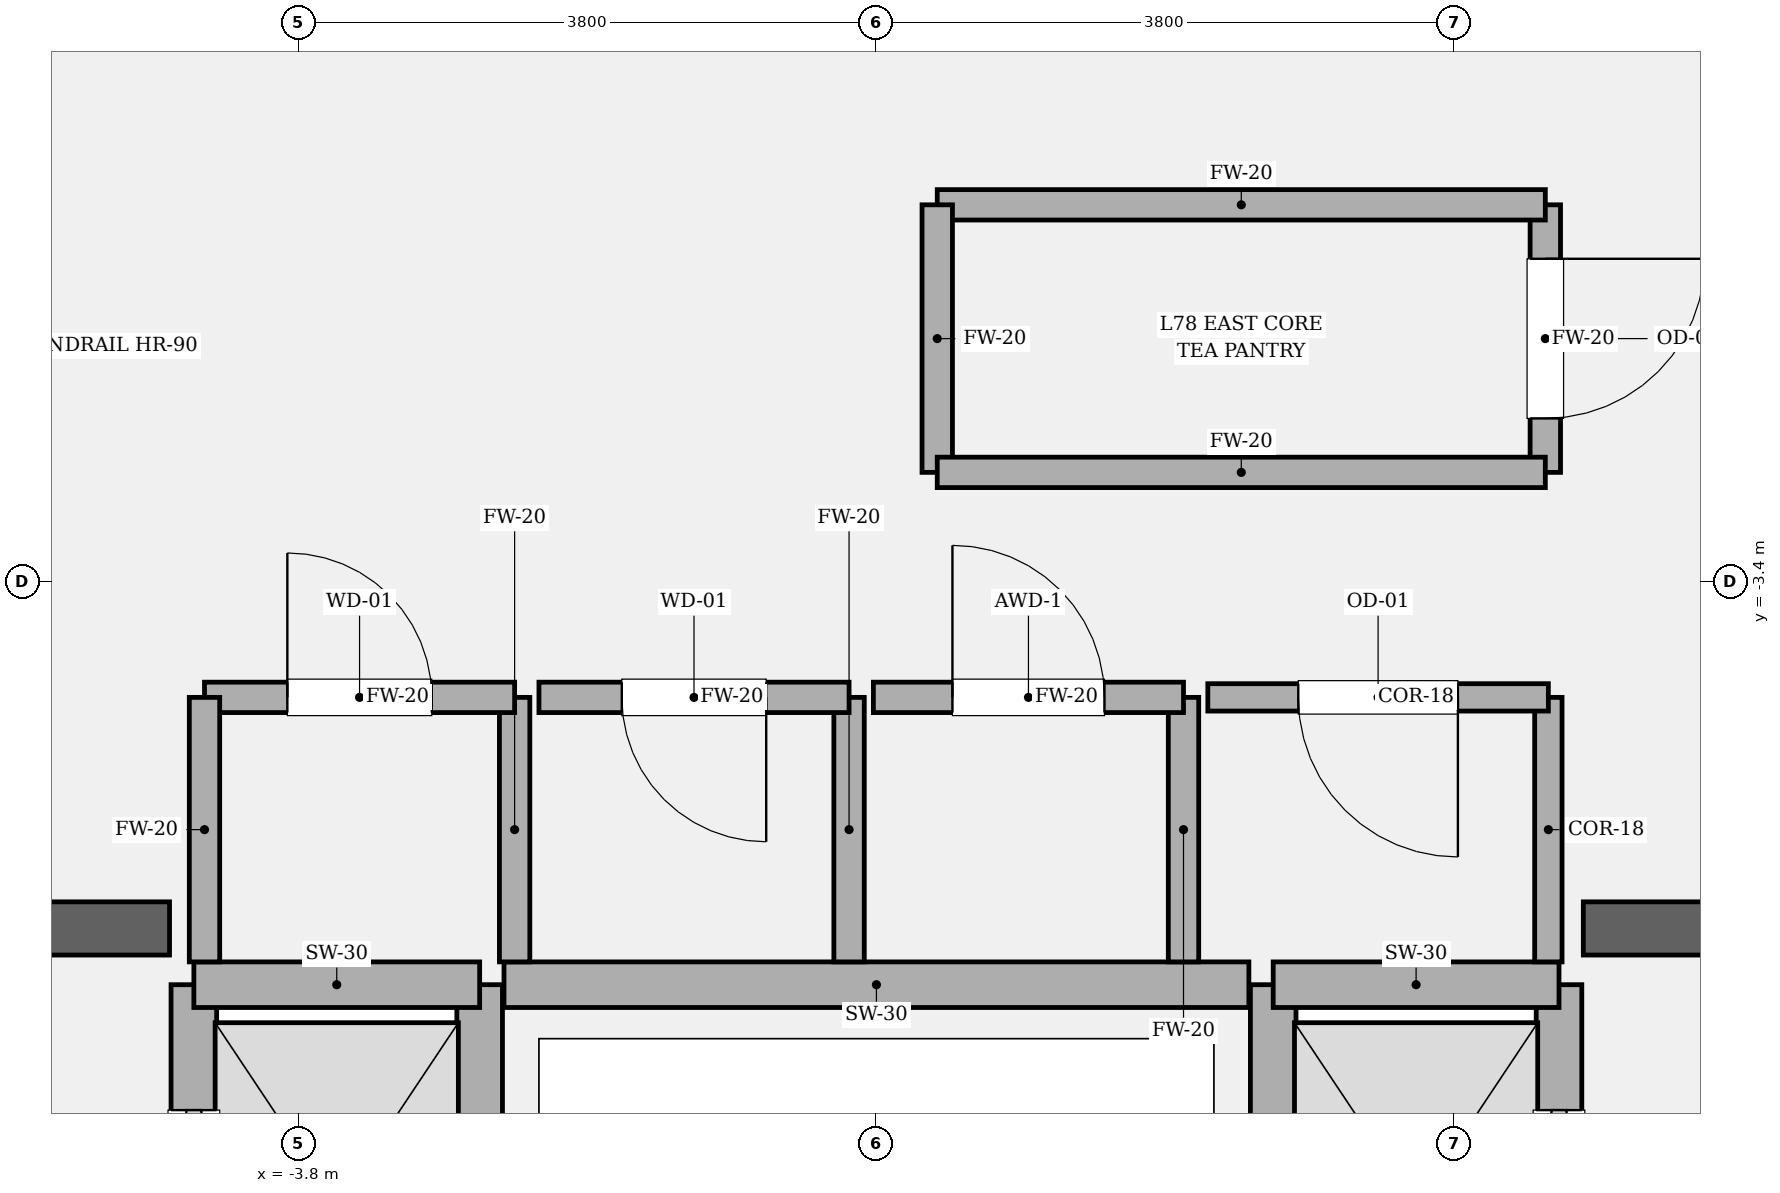
"""IFC4 building model, lengths in metres.
Left out: names, types, materials, properties, quantities, classifications, styles, units other than length and angle.
Written with IfcOpenShell. Run it as: python <this file> out.ifc"""

import sys

from ifc_helpers import new_model, si_unit, direction, frame, frame_2d, origin, place, context, subcontext, project, spatial, rectangle, extrude, element, fill, save


model = new_model("IFC4")
c1 = context("Model", 3, precision=1e-05, world=origin(), true_north=direction((0.0, 1.0)))
c2 = subcontext(c1, "Body", "Model", "MODEL_VIEW")
j1 = project(units=[si_unit("LENGTHUNIT", "METRE"), si_unit("PLANEANGLEUNIT", "RADIAN")], contexts=[c1])
p1 = place(None, origin())
s1 = spatial("IfcSite", under=j1, at=p1, CompositionType="ELEMENT")
p2 = place(p1, origin())
s2 = spatial("IfcBuilding", under=s1, at=p2, CompositionType="ELEMENT")
p3 = place(p2, frame((0.0, 0.0, 330.0)))
s3 = spatial("IfcBuildingStorey", under=s2, at=p3, CompositionType="ELEMENT", Elevation=330.0)
p4 = place(p3, frame((-9.975, -5.68, 0.0), z_axis=(0.0, 0.0, 1.0), x_axis=(1.0, 0.0, 0.0)))
e1 = element("IfcWall", 1, at=p4, inside=s3, PredefinedType="SOLIDWALL", context=c2, shape_type="SweptSolid", body=[
    extrude(rectangle(XDim=5.325, YDim=0.35, at=frame_2d((2.663, 0.0))), origin(), (0.0, 0.0, 1.0), 4.2),
])
p5 = place(p4, frame((1.435, 0.0, 0.0)))
e2 = element("IfcOpeningElement", 2, at=p5, cuts=e1, PredefinedType="OPENING", context=c2, shape_type="SweptSolid", body=[
    extrude(rectangle(XDim=1.18, YDim=2.2, at=frame_2d((0.59, 1.1))), frame((0.0, 0.185, 0.0), z_axis=(0.0, -1.0, 0.0), x_axis=(1.0, 0.0, 0.0)), (0.0, 0.0, 1.0), 0.37),
])
p6 = place(p3, frame((4.65, -5.68, 0.0), z_axis=(0.0, 0.0, 1.0), x_axis=(1.0, 0.0, 0.0)))
e3 = element("IfcWall", 3, at=p6, inside=s3, PredefinedType="SOLIDWALL", context=c2, shape_type="SweptSolid", body=[
    extrude(rectangle(XDim=5.325, YDim=0.35, at=frame_2d((2.663, 0.0))), origin(), (0.0, 0.0, 1.0), 4.2),
])
p7 = place(p6, frame((2.71, 0.0, 0.0)))
e4 = element("IfcOpeningElement", 4, at=p7, cuts=e3, PredefinedType="OPENING", context=c2, shape_type="SweptSolid", body=[
    extrude(rectangle(XDim=1.18, YDim=2.2, at=frame_2d((0.59, 1.1))), frame((0.0, 0.185, 0.0), z_axis=(0.0, -1.0, 0.0), x_axis=(1.0, 0.0, 0.0)), (0.0, 0.0, 1.0), 0.37),
])
p8 = place(p3, frame((-4.49, -8.82, 0.0), z_axis=(0.0, 0.0, 1.0), x_axis=(0.0, 1.0, 0.0)))
e5 = element("IfcWall", 5, at=p8, inside=s3, PredefinedType="SOLIDWALL", context=c2, shape_type="SweptSolid", body=[
    extrude(rectangle(XDim=2.77, YDim=0.3, at=frame_2d((1.385, 0.0))), origin(), (0.0, 0.0, 1.0), 3.94),
])
p9 = place(p8, frame((0.825, 0.0, 0.0)))
e6 = element("IfcOpeningElement", 6, at=p9, cuts=e5, PredefinedType="OPENING", context=c2, shape_type="SweptSolid", body=[
    extrude(rectangle(XDim=1.12, YDim=2.25, at=frame_2d((0.56, 1.125))), frame((0.0, 0.16, 0.0), z_axis=(0.0, -1.0, 0.0), x_axis=(1.0, 0.0, 0.0)), (0.0, 0.0, 1.0), 0.32),
])
p10 = place(p3, frame((-2.61, -8.82, 0.0), z_axis=(0.0, 0.0, 1.0), x_axis=(0.0, 1.0, 0.0)))
e7 = element("IfcWall", 7, at=p10, inside=s3, PredefinedType="SOLIDWALL", context=c2, shape_type="SweptSolid", body=[
    extrude(rectangle(XDim=2.77, YDim=0.3, at=frame_2d((1.385, 0.0))), origin(), (0.0, 0.0, 1.0), 3.94),
])
p11 = place(p3, frame((-4.49, -6.05, 0.0), z_axis=(0.0, 0.0, 1.0), x_axis=(1.0, 0.0, 0.0)))
e8 = element("IfcWall", 8, at=p11, inside=s3, PredefinedType="SOLIDWALL", context=c2, shape_type="SweptSolid", body=[
    extrude(rectangle(XDim=1.88, YDim=0.3, at=frame_2d((0.94, 0.0))), origin(), (0.0, 0.0, 1.0), 3.94),
])
p12 = place(p3, frame((4.49, -8.82, 0.0), z_axis=(0.0, 0.0, 1.0), x_axis=(0.0, 1.0, 0.0)))
e9 = element("IfcWall", 9, at=p12, inside=s3, PredefinedType="SOLIDWALL", context=c2, shape_type="SweptSolid", body=[
    extrude(rectangle(XDim=2.77, YDim=0.3, at=frame_2d((1.385, 0.0))), origin(), (0.0, 0.0, 1.0), 3.94),
])
p13 = place(p12, frame((0.825, 0.0, 0.0)))
e10 = element("IfcOpeningElement", 10, at=p13, cuts=e9, PredefinedType="OPENING", context=c2, shape_type="SweptSolid", body=[
    extrude(rectangle(XDim=1.12, YDim=2.25, at=frame_2d((0.56, 1.125))), frame((0.0, 0.16, 0.0), z_axis=(0.0, -1.0, 0.0), x_axis=(1.0, 0.0, 0.0)), (0.0, 0.0, 1.0), 0.32),
])
p14 = place(p3, frame((2.61, -8.82, 0.0), z_axis=(0.0, 0.0, 1.0), x_axis=(0.0, 1.0, 0.0)))
e11 = element("IfcWall", 11, at=p14, inside=s3, PredefinedType="SOLIDWALL", context=c2, shape_type="SweptSolid", body=[
    extrude(rectangle(XDim=2.77, YDim=0.3, at=frame_2d((1.385, 0.0))), origin(), (0.0, 0.0, 1.0), 3.94),
])
p15 = place(p3, frame((2.61, -6.05, 0.0), z_axis=(0.0, 0.0, 1.0), x_axis=(1.0, 0.0, 0.0)))
e12 = element("IfcWall", 12, at=p15, inside=s3, PredefinedType="SOLIDWALL", context=c2, shape_type="SweptSolid", body=[
    extrude(rectangle(XDim=1.88, YDim=0.3, at=frame_2d((0.94, 0.0))), origin(), (0.0, 0.0, 1.0), 3.94),
])
p16 = place(p3, frame((-2.45, -6.05, 0.0), z_axis=(0.0, 0.0, 1.0), x_axis=(1.0, 0.0, 0.0)))
e13 = element("IfcWall", 13, at=p16, inside=s3, PredefinedType="SOLIDWALL", context=c2, shape_type="SweptSolid", body=[
    extrude(rectangle(XDim=4.9, YDim=0.3, at=frame_2d((2.45, 0.0))), origin(), (0.0, 0.0, 1.0), 3.94),
])
p17 = place(p3, frame((-2.38, -5.9, 0.0), z_axis=(0.0, 0.0, 1.0), x_axis=(0.0, 1.0, 0.0)))
e14 = element("IfcWall", 14, at=p17, inside=s3, PredefinedType="SOLIDWALL", context=c2, shape_type="SweptSolid", body=[
    extrude(rectangle(XDim=1.74, YDim=0.2, at=frame_2d((0.87, 0.0))), origin(), (0.0, 0.0, 1.0), 3.94),
])
p18 = place(p3, frame((-2.38, -4.16, 0.0), z_axis=(0.0, 0.0, 1.0), x_axis=(-1.0, 0.0, 0.0)))
e15 = element("IfcWall", 15, at=p18, inside=s3, PredefinedType="SOLIDWALL", context=c2, shape_type="SweptSolid", body=[
    extrude(rectangle(XDim=2.04, YDim=0.2, at=frame_2d((1.02, 0.0))), origin(), (0.0, 0.0, 1.0), 3.94),
])
p19 = place(p18, frame((0.545, 0.0, 0.0)))
e16 = element("IfcOpeningElement", 16, at=p19, cuts=e15, PredefinedType="OPENING", context=c2, shape_type="SweptSolid", body=[
    extrude(rectangle(XDim=0.95, YDim=2.15, at=frame_2d((0.475, 1.075))), frame((0.0, 0.11, 0.0), z_axis=(0.0, -1.0, 0.0), x_axis=(1.0, 0.0, 0.0)), (0.0, 0.0, 1.0), 0.22),
])
for number, where, z_axis, x_axis in (
    (17, (-4.42, -4.16, 0.0), (0.0, 0.0, 1.0), (0.0, -1.0, 0.0)),
    (18, (-0.18, -5.9, 0.0), (0.0, 0.0, 1.0), (0.0, 1.0, 0.0)),
):
    element("IfcWall", number, at=place(p3, frame(where, z_axis=z_axis, x_axis=x_axis)), inside=s3, PredefinedType="SOLIDWALL", context=c2, shape_type="SweptSolid", body=[
        extrude(rectangle(XDim=1.74, YDim=0.2, at=frame_2d((0.87, 0.0))), origin(), (0.0, 0.0, 1.0), 3.94),
    ])
p20 = place(p3, frame((-0.18, -4.16, 0.0), z_axis=(0.0, 0.0, 1.0), x_axis=(-1.0, 0.0, 0.0)))
e19 = element("IfcWall", 19, at=p20, inside=s3, PredefinedType="SOLIDWALL", context=c2, shape_type="SweptSolid", body=[
    extrude(rectangle(XDim=2.04, YDim=0.2, at=frame_2d((1.02, 0.0))), origin(), (0.0, 0.0, 1.0), 3.94),
])
p21 = place(p20, frame((0.545, 0.0, 0.0)))
e20 = element("IfcOpeningElement", 20, at=p21, cuts=e19, PredefinedType="OPENING", context=c2, shape_type="SweptSolid", body=[
    extrude(rectangle(XDim=0.95, YDim=2.15, at=frame_2d((0.475, 1.075))), frame((0.0, 0.11, 0.0), z_axis=(0.0, -1.0, 0.0), x_axis=(1.0, 0.0, 0.0)), (0.0, 0.0, 1.0), 0.22),
])
p22 = place(p3, frame((2.02, -5.9, 0.0), z_axis=(0.0, 0.0, 1.0), x_axis=(0.0, 1.0, 0.0)))
e21 = element("IfcWall", 21, at=p22, inside=s3, PredefinedType="SOLIDWALL", context=c2, shape_type="SweptSolid", body=[
    extrude(rectangle(XDim=1.74, YDim=0.2, at=frame_2d((0.87, 0.0))), origin(), (0.0, 0.0, 1.0), 3.94),
])
p23 = place(p3, frame((2.02, -4.16, 0.0), z_axis=(0.0, 0.0, 1.0), x_axis=(-1.0, 0.0, 0.0)))
e22 = element("IfcWall", 22, at=p23, inside=s3, PredefinedType="SOLIDWALL", context=c2, shape_type="SweptSolid", body=[
    extrude(rectangle(XDim=2.04, YDim=0.2, at=frame_2d((1.02, 0.0))), origin(), (0.0, 0.0, 1.0), 3.94),
])
p24 = place(p23, frame((0.52, 0.0, 0.0)))
e23 = element("IfcOpeningElement", 23, at=p24, cuts=e22, PredefinedType="OPENING", context=c2, shape_type="SweptSolid", body=[
    extrude(rectangle(XDim=1.0, YDim=2.15, at=frame_2d((0.5, 1.075))), frame((0.0, 0.11, 0.0), z_axis=(0.0, -1.0, 0.0), x_axis=(1.0, 0.0, 0.0)), (0.0, 0.0, 1.0), 0.22),
])
p25 = place(p3, frame((4.42, -5.9, 0.0), z_axis=(0.0, 0.0, 1.0), x_axis=(0.0, 1.0, 0.0)))
e24 = element("IfcWall", 24, at=p25, inside=s3, PredefinedType="PARTITIONING", context=c2, shape_type="SweptSolid", body=[
    extrude(rectangle(XDim=1.74, YDim=0.18, at=frame_2d((0.87, 0.0))), origin(), (0.0, 0.0, 1.0), 3.94),
])
p26 = place(p3, frame((4.42, -4.16, 0.0), z_axis=(0.0, 0.0, 1.0), x_axis=(-1.0, 0.0, 0.0)))
e25 = element("IfcWall", 25, at=p26, inside=s3, PredefinedType="PARTITIONING", context=c2, shape_type="SweptSolid", body=[
    extrude(rectangle(XDim=2.24, YDim=0.18, at=frame_2d((1.12, 0.0))), origin(), (0.0, 0.0, 1.0), 3.94),
])
p27 = place(p26, frame((0.595, 0.0, 0.0)))
e26 = element("IfcOpeningElement", 26, at=p27, cuts=e25, PredefinedType="OPENING", context=c2, shape_type="SweptSolid", body=[
    extrude(rectangle(XDim=1.05, YDim=2.2, at=frame_2d((0.525, 1.1))), frame((0.0, 0.1, 0.0), z_axis=(0.0, -1.0, 0.0), x_axis=(1.0, 0.0, 0.0)), (0.0, 0.0, 1.0), 0.2),
])
p28 = place(p3, frame((4.4, -2.68, 0.0), z_axis=(0.0, 0.0, 1.0), x_axis=(0.0, 1.0, 0.0)))
e27 = element("IfcWall", 27, at=p28, inside=s3, PredefinedType="SOLIDWALL", context=c2, shape_type="SweptSolid", body=[
    extrude(rectangle(XDim=1.76, YDim=0.2, at=frame_2d((0.88, 0.0))), origin(), (0.0, 0.0, 1.0), 3.94),
])
p29 = place(p28, frame((0.355, 0.0, 0.0)))
e28 = element("IfcOpeningElement", 28, at=p29, cuts=e27, PredefinedType="OPENING", context=c2, shape_type="SweptSolid", body=[
    extrude(rectangle(XDim=1.05, YDim=2.2, at=frame_2d((0.525, 1.1))), frame((0.0, 0.11, 0.0), z_axis=(0.0, -1.0, 0.0), x_axis=(1.0, 0.0, 0.0)), (0.0, 0.0, 1.0), 0.22),
])
p30 = place(p3, frame((4.4, -0.92, 0.0), z_axis=(0.0, 0.0, 1.0), x_axis=(-1.0, 0.0, 0.0)))
e29 = element("IfcWall", 29, at=p30, inside=s3, PredefinedType="SOLIDWALL", context=c2, shape_type="SweptSolid", body=[
    extrude(rectangle(XDim=4.0, YDim=0.2, at=frame_2d((2.0, 0.0))), origin(), (0.0, 0.0, 1.0), 3.94),
])
p31 = place(p3, frame((0.4, -0.92, 0.0), z_axis=(0.0, 0.0, 1.0), x_axis=(0.0, -1.0, 0.0)))
e30 = element("IfcWall", 30, at=p31, inside=s3, PredefinedType="SOLIDWALL", context=c2, shape_type="SweptSolid", body=[
    extrude(rectangle(XDim=1.76, YDim=0.2, at=frame_2d((0.88, 0.0))), origin(), (0.0, 0.0, 1.0), 3.94),
])
p32 = place(p3, frame((0.4, -2.68, 0.0), z_axis=(0.0, 0.0, 1.0), x_axis=(1.0, 0.0, 0.0)))
e31 = element("IfcWall", 31, at=p32, inside=s3, PredefinedType="SOLIDWALL", context=c2, shape_type="SweptSolid", body=[
    extrude(rectangle(XDim=4.0, YDim=0.2, at=frame_2d((2.0, 0.0))), origin(), (0.0, 0.0, 1.0), 3.94),
])
p33 = place(p9, origin())
e32 = element("IfcDoor", 32, at=p33, inside=s3, OperationType="SLIDING_TO_LEFT", PredefinedType="DOOR", context=c2, shape_type="SweptSolid", body=[
    extrude(rectangle(XDim=1.12, YDim=2.25, at=frame_2d((0.56, 1.125))), frame((0.0, 0.025, 0.0), z_axis=(0.0, -1.0, 0.0), x_axis=(1.0, 0.0, 0.0)), (0.0, 0.0, 1.0), 0.05),
])
fill(e6, e32)
p34 = place(p13, origin())
e33 = element("IfcDoor", 33, at=p34, inside=s3, OperationType="SLIDING_TO_RIGHT", PredefinedType="DOOR", context=c2, shape_type="SweptSolid", body=[
    extrude(rectangle(XDim=1.12, YDim=2.25, at=frame_2d((0.56, 1.125))), frame((0.0, 0.025, 0.0), z_axis=(0.0, -1.0, 0.0), x_axis=(1.0, 0.0, 0.0)), (0.0, 0.0, 1.0), 0.05),
])
fill(e10, e33)
p35 = place(p19, origin())
e34 = element("IfcDoor", 34, at=p35, inside=s3, OperationType="SINGLE_SWING_RIGHT", PredefinedType="DOOR", context=c2, shape_type="SweptSolid", body=[
    extrude(rectangle(XDim=0.95, YDim=2.15, at=frame_2d((0.475, 1.075))), frame((0.0, 0.025, 0.0), z_axis=(0.0, -1.0, 0.0), x_axis=(1.0, 0.0, 0.0)), (0.0, 0.0, 1.0), 0.05),
])
fill(e16, e34)
p36 = place(p21, origin())
e35 = element("IfcDoor", 35, at=p36, inside=s3, OperationType="SINGLE_SWING_LEFT", PredefinedType="DOOR", context=c2, shape_type="SweptSolid", body=[
    extrude(rectangle(XDim=0.95, YDim=2.15, at=frame_2d((0.475, 1.075))), frame((0.0, 0.025, 0.0), z_axis=(0.0, -1.0, 0.0), x_axis=(1.0, 0.0, 0.0)), (0.0, 0.0, 1.0), 0.05),
])
fill(e20, e35)
p37 = place(p24, origin())
e36 = element("IfcDoor", 36, at=p37, inside=s3, OperationType="SINGLE_SWING_RIGHT", PredefinedType="DOOR", context=c2, shape_type="SweptSolid", body=[
    extrude(rectangle(XDim=1.0, YDim=2.15, at=frame_2d((0.5, 1.075))), frame((0.0, 0.025, 0.0), z_axis=(0.0, -1.0, 0.0), x_axis=(1.0, 0.0, 0.0)), (0.0, 0.0, 1.0), 0.05),
])
fill(e23, e36)
p38 = place(p27, origin())
e37 = element("IfcDoor", 37, at=p38, inside=s3, OperationType="SINGLE_SWING_LEFT", PredefinedType="DOOR", context=c2, shape_type="SweptSolid", body=[
    extrude(rectangle(XDim=1.05, YDim=2.2, at=frame_2d((0.525, 1.1))), frame((0.0, 0.025, 0.0), z_axis=(0.0, -1.0, 0.0), x_axis=(1.0, 0.0, 0.0)), (0.0, 0.0, 1.0), 0.05),
])
fill(e26, e37)
p39 = place(p29, origin())
e38 = element("IfcDoor", 38, at=p39, inside=s3, OperationType="SINGLE_SWING_RIGHT", PredefinedType="DOOR", context=c2, shape_type="SweptSolid", body=[
    extrude(rectangle(XDim=1.05, YDim=2.2, at=frame_2d((0.525, 1.1))), frame((0.0, 0.025, 0.0), z_axis=(0.0, -1.0, 0.0), x_axis=(1.0, 0.0, 0.0)), (0.0, 0.0, 1.0), 0.05),
])
fill(e28, e38)
save(model, sys.argv[1])
